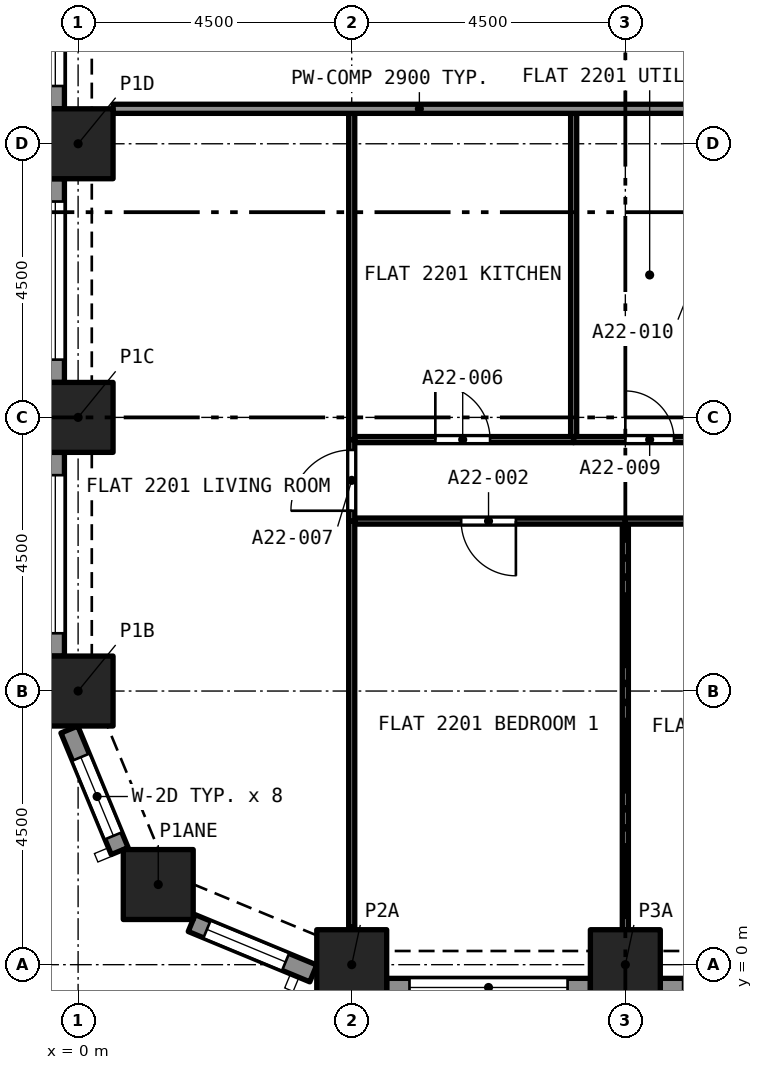
"""IFC4 building model, lengths in metres.
Left out: names, types, materials, properties, quantities, classifications, styles, units other than length and angle.
Written with IfcOpenShell. Run it as: python <this file> out.ifc"""

import sys

from ifc_helpers import new_model, si_unit, direction, frame, frame_2d, origin, origin_2d, place, context, subcontext, project, spatial, rectangle, extrude, element, fill, save


model = new_model("IFC4")
c1 = context("Model", 3, precision=1e-05, world=origin(), true_north=direction((0.0, 1.0)))
c2 = subcontext(c1, "Body", "Model", "MODEL_VIEW")
j1 = project(units=[si_unit("LENGTHUNIT", "METRE"), si_unit("PLANEANGLEUNIT", "RADIAN")], contexts=[c1])
p1 = place(None, origin())
s1 = spatial("IfcSite", under=j1, at=p1, CompositionType="ELEMENT")
p2 = place(p1, origin())
s2 = spatial("IfcBuilding", under=s1, at=p2, CompositionType="ELEMENT")
p3 = place(p2, frame((0.0, 0.0, 83.2)))
s3 = spatial("IfcBuildingStorey", under=s2, at=p3, CompositionType="ELEMENT", Elevation=83.2)
for number, where, z_axis, x_axis in (
    (1, (4.5, 0.0, 0.0), (0.0, 0.0, 1.0), (1.0, 0.0, 0.0)),
    (2, (9.0, 0.0, 0.0), (0.0, 0.0, 1.0), (1.0, 0.0, 0.0)),
    (3, (1.318, 1.318, 0.0), (0.0, 0.0, 1.0), (1.0, 0.0, 0.0)),
    (4, (0.0, 4.5, 0.0), (0.0, 0.0, 1.0), (1.0, 0.0, 0.0)),
    (5, (0.0, 9.0, 0.0), (0.0, 0.0, 1.0), (1.0, 0.0, 0.0)),
    (6, (0.0, 13.5, 0.0), (0.0, 0.0, 1.0), (1.0, 0.0, 0.0)),
):
    element("IfcColumn", number, at=place(p3, frame(where, z_axis=z_axis, x_axis=x_axis)), inside=s3, PredefinedType="COLUMN", context=c2, shape_type="SweptSolid", body=[
        extrude(rectangle(XDim=1.15, YDim=1.15, at=origin_2d()), origin(), (0.0, 0.0, 1.0), 3.2),
    ])
p4 = place(p3, frame((0.684, 1.869, 0.0), z_axis=(0.0, 0.0, 1.0), x_axis=(-0.382723818695, 0.923862802911, 0.0)))
e7 = element("IfcWall", 7, at=p4, inside=s3, PredefinedType="SOLIDWALL", context=c2, shape_type="SweptSolid", body=[
    extrude(rectangle(XDim=2.164, YDim=0.3, at=frame_2d((1.082, 0.0))), origin(), (0.0, 0.0, 1.0), 3.2),
])
p5 = place(p4, frame((0.271, 0.0, 0.45)))
e8 = element("IfcOpeningElement", 8, at=p5, cuts=e7, PredefinedType="OPENING", context=c2, shape_type="SweptSolid", body=[
    extrude(rectangle(XDim=1.4, YDim=1.95, at=frame_2d((0.7, 0.975))), frame((0.0, 0.16, 0.0), z_axis=(0.0, -1.0, 0.0), x_axis=(1.0, 0.0, 0.0)), (0.0, 0.0, 1.0), 0.32),
])
p6 = place(p3, frame((3.868, -0.144, 0.0), z_axis=(0.0, 0.0, 1.0), x_axis=(-0.923862802911, 0.382723818695, 0.0)))
e9 = element("IfcWall", 9, at=p6, inside=s3, PredefinedType="SOLIDWALL", context=c2, shape_type="SweptSolid", body=[
    extrude(rectangle(XDim=2.164, YDim=0.3, at=frame_2d((1.082, 0.0))), origin(), (0.0, 0.0, 1.0), 3.2),
])
p7 = place(p6, frame((0.493, 0.0, 0.45)))
e10 = element("IfcOpeningElement", 10, at=p7, cuts=e9, PredefinedType="OPENING", context=c2, shape_type="SweptSolid", body=[
    extrude(rectangle(XDim=1.4, YDim=1.95, at=frame_2d((0.7, 0.975))), frame((0.0, 0.16, 0.0), z_axis=(0.0, -1.0, 0.0), x_axis=(1.0, 0.0, 0.0)), (0.0, 0.0, 1.0), 0.32),
])
p8 = place(p3, frame((8.425, -0.375, 0.0), z_axis=(0.0, 0.0, 1.0), x_axis=(-1.0, 0.0, 0.0)))
e11 = element("IfcWall", 11, at=p8, inside=s3, PredefinedType="SOLIDWALL", context=c2, shape_type="SweptSolid", body=[
    extrude(rectangle(XDim=3.35, YDim=0.3, at=frame_2d((1.675, 0.0))), origin(), (0.0, 0.0, 1.0), 3.2),
])
p9 = place(p8, frame((0.375, 0.0, 0.45)))
e12 = element("IfcOpeningElement", 12, at=p9, cuts=e11, PredefinedType="OPENING", context=c2, shape_type="SweptSolid", body=[
    extrude(rectangle(XDim=2.6, YDim=1.95, at=frame_2d((1.3, 0.975))), frame((0.0, 0.16, 0.0), z_axis=(0.0, -1.0, 0.0), x_axis=(1.0, 0.0, 0.0)), (0.0, 0.0, 1.0), 0.32),
])
p10 = place(p3, frame((12.925, -0.375, 0.0), z_axis=(0.0, 0.0, 1.0), x_axis=(-1.0, 0.0, 0.0)))
e13 = element("IfcWall", 13, at=p10, inside=s3, PredefinedType="SOLIDWALL", context=c2, shape_type="SweptSolid", body=[
    extrude(rectangle(XDim=3.35, YDim=0.3, at=frame_2d((1.675, 0.0))), origin(), (0.0, 0.0, 1.0), 3.2),
])
p11 = place(p10, frame((0.375, 0.0, 0.45)))
e14 = element("IfcOpeningElement", 14, at=p11, cuts=e13, PredefinedType="OPENING", context=c2, shape_type="SweptSolid", body=[
    extrude(rectangle(XDim=2.6, YDim=1.95, at=frame_2d((1.3, 0.975))), frame((0.0, 0.16, 0.0), z_axis=(0.0, -1.0, 0.0), x_axis=(1.0, 0.0, 0.0)), (0.0, 0.0, 1.0), 0.32),
])
p12 = place(p3, frame((-0.375, 14.075, 0.0), z_axis=(0.0, 0.0, 1.0), x_axis=(0.0, 1.0, 0.0)))
e15 = element("IfcWall", 15, at=p12, inside=s3, PredefinedType="SOLIDWALL", context=c2, shape_type="SweptSolid", body=[
    extrude(rectangle(XDim=3.35, YDim=0.3, at=frame_2d((1.675, 0.0))), origin(), (0.0, 0.0, 1.0), 3.2),
])
p13 = place(p12, frame((0.375, 0.0, 0.45)))
e16 = element("IfcOpeningElement", 16, at=p13, cuts=e15, PredefinedType="OPENING", context=c2, shape_type="SweptSolid", body=[
    extrude(rectangle(XDim=2.6, YDim=1.95, at=frame_2d((1.3, 0.975))), frame((0.0, 0.16, 0.0), z_axis=(0.0, -1.0, 0.0), x_axis=(1.0, 0.0, 0.0)), (0.0, 0.0, 1.0), 0.32),
])
p14 = place(p3, frame((-0.375, 9.575, 0.0), z_axis=(0.0, 0.0, 1.0), x_axis=(0.0, 1.0, 0.0)))
e17 = element("IfcWall", 17, at=p14, inside=s3, PredefinedType="SOLIDWALL", context=c2, shape_type="SweptSolid", body=[
    extrude(rectangle(XDim=3.35, YDim=0.3, at=frame_2d((1.675, 0.0))), origin(), (0.0, 0.0, 1.0), 3.2),
])
p15 = place(p14, frame((0.375, 0.0, 0.45)))
e18 = element("IfcOpeningElement", 18, at=p15, cuts=e17, PredefinedType="OPENING", context=c2, shape_type="SweptSolid", body=[
    extrude(rectangle(XDim=2.6, YDim=1.95, at=frame_2d((1.3, 0.975))), frame((0.0, 0.16, 0.0), z_axis=(0.0, -1.0, 0.0), x_axis=(1.0, 0.0, 0.0)), (0.0, 0.0, 1.0), 0.32),
])
p16 = place(p3, frame((-0.375, 5.075, 0.0), z_axis=(0.0, 0.0, 1.0), x_axis=(0.0, 1.0, 0.0)))
e19 = element("IfcWall", 19, at=p16, inside=s3, PredefinedType="SOLIDWALL", context=c2, shape_type="SweptSolid", body=[
    extrude(rectangle(XDim=3.35, YDim=0.3, at=frame_2d((1.675, 0.0))), origin(), (0.0, 0.0, 1.0), 3.2),
])
p17 = place(p16, frame((0.375, 0.0, 0.45)))
e20 = element("IfcOpeningElement", 20, at=p17, cuts=e19, PredefinedType="OPENING", context=c2, shape_type="SweptSolid", body=[
    extrude(rectangle(XDim=2.6, YDim=1.95, at=frame_2d((1.3, 0.975))), frame((0.0, 0.16, 0.0), z_axis=(0.0, -1.0, 0.0), x_axis=(1.0, 0.0, 0.0)), (0.0, 0.0, 1.0), 0.32),
])
p18 = place(p3, frame((9.0, 0.575, 0.0), z_axis=(0.0, 0.0, 1.0), x_axis=(0.0, 1.0, 0.0)))
e21 = element("IfcWall", 21, at=p18, inside=s3, PredefinedType="PARTITIONING", context=c2, shape_type="SweptSolid", body=[
    extrude(rectangle(XDim=6.67, YDim=0.1, at=frame_2d((3.335, 0.0))), origin(), (0.0, 0.0, 1.0), 2.9),
])
p19 = place(p3, frame((9.0, 7.295, 0.0), z_axis=(0.0, 0.0, 1.0), x_axis=(-1.0, 0.0, 0.0)))
e22 = element("IfcWall", 22, at=p19, inside=s3, PredefinedType="PARTITIONING", context=c2, shape_type="SweptSolid", body=[
    extrude(rectangle(XDim=4.45, YDim=0.1, at=frame_2d((2.225, 0.0))), origin(), (0.0, 0.0, 1.0), 2.9),
])
p20 = place(p19, frame((1.8, 0.0, 0.0)))
e23 = element("IfcOpeningElement", 23, at=p20, cuts=e22, PredefinedType="OPENING", context=c2, shape_type="SweptSolid", body=[
    extrude(rectangle(XDim=0.9, YDim=2.1, at=frame_2d((0.45, 1.05))), frame((0.0, 0.06, 0.0), z_axis=(0.0, -1.0, 0.0), x_axis=(1.0, 0.0, 0.0)), (0.0, 0.0, 1.0), 0.12),
])
p21 = place(p3, frame((4.5, 0.622, 0.0), z_axis=(0.0, 0.0, 1.0), x_axis=(0.0, 1.0, 0.0)))
e24 = element("IfcWall", 24, at=p21, inside=s3, PredefinedType="PARTITIONING", context=c2, shape_type="SweptSolid", body=[
    extrude(rectangle(XDim=6.673, YDim=0.1, at=frame_2d((3.336, 0.0))), origin(), (0.0, 0.0, 1.0), 2.9),
])
p22 = place(p3, frame((13.5, 7.295, 0.0), z_axis=(0.0, 0.0, 1.0), x_axis=(-1.0, 0.0, 0.0)))
e25 = element("IfcWall", 25, at=p22, inside=s3, PredefinedType="PARTITIONING", context=c2, shape_type="SweptSolid", body=[
    extrude(rectangle(XDim=4.5, YDim=0.1, at=frame_2d((2.25, 0.0))), origin(), (0.0, 0.0, 1.0), 2.9),
])
p23 = place(p22, frame((1.8, 0.0, 0.0)))
e26 = element("IfcOpeningElement", 26, at=p23, cuts=e25, PredefinedType="OPENING", context=c2, shape_type="SweptSolid", body=[
    extrude(rectangle(XDim=0.9, YDim=2.1, at=frame_2d((0.45, 1.05))), frame((0.0, 0.06, 0.0), z_axis=(0.0, -1.0, 0.0), x_axis=(1.0, 0.0, 0.0)), (0.0, 0.0, 1.0), 0.12),
])
p24 = place(p3, frame((4.55, 8.635, 0.0), z_axis=(0.0, 0.0, 1.0), x_axis=(1.0, 0.0, 0.0)))
e27 = element("IfcWall", 27, at=p24, inside=s3, PredefinedType="PARTITIONING", context=c2, shape_type="SweptSolid", body=[
    extrude(rectangle(XDim=3.6, YDim=0.1, at=frame_2d((1.8, 0.0))), origin(), (0.0, 0.0, 1.0), 2.9),
])
p25 = place(p24, frame((1.325, 0.0, 0.0)))
e28 = element("IfcOpeningElement", 28, at=p25, cuts=e27, PredefinedType="OPENING", context=c2, shape_type="SweptSolid", body=[
    extrude(rectangle(XDim=0.9, YDim=2.1, at=frame_2d((0.45, 1.05))), frame((0.0, 0.06, 0.0), z_axis=(0.0, -1.0, 0.0), x_axis=(1.0, 0.0, 0.0)), (0.0, 0.0, 1.0), 0.12),
])
p26 = place(p3, frame((4.5, 7.295, 0.0), z_axis=(0.0, 0.0, 1.0), x_axis=(0.0, 1.0, 0.0)))
e29 = element("IfcWall", 29, at=p26, inside=s3, PredefinedType="PARTITIONING", context=c2, shape_type="SweptSolid", body=[
    extrude(rectangle(XDim=1.34, YDim=0.1, at=frame_2d((0.67, 0.0))), origin(), (0.0, 0.0, 1.0), 2.9),
])
p27 = place(p26, frame((0.17, 0.0, 0.0)))
e30 = element("IfcOpeningElement", 30, at=p27, cuts=e29, PredefinedType="OPENING", context=c2, shape_type="SweptSolid", body=[
    extrude(rectangle(XDim=1.0, YDim=2.1, at=frame_2d((0.5, 1.05))), frame((0.0, 0.06, 0.0), z_axis=(0.0, -1.0, 0.0), x_axis=(1.0, 0.0, 0.0)), (0.0, 0.0, 1.0), 0.12),
])
p28 = place(p3, frame((8.15, 8.635, 0.0), z_axis=(0.0, 0.0, 1.0), x_axis=(1.0, 0.0, 0.0)))
e31 = element("IfcWall", 31, at=p28, inside=s3, PredefinedType="PARTITIONING", context=c2, shape_type="SweptSolid", body=[
    extrude(rectangle(XDim=2.55, YDim=0.1, at=frame_2d((1.275, 0.0))), origin(), (0.0, 0.0, 1.0), 2.9),
])
p29 = place(p28, frame((0.85, 0.0, 0.0)))
e32 = element("IfcOpeningElement", 32, at=p29, cuts=e31, PredefinedType="OPENING", context=c2, shape_type="SweptSolid", body=[
    extrude(rectangle(XDim=0.8, YDim=2.1, at=frame_2d((0.4, 1.05))), frame((0.0, 0.06, 0.0), z_axis=(0.0, -1.0, 0.0), x_axis=(1.0, 0.0, 0.0)), (0.0, 0.0, 1.0), 0.12),
])
p30 = place(p3, frame((4.5, 8.635, 0.0), z_axis=(0.0, 0.0, 1.0), x_axis=(0.0, 1.0, 0.0)))
e33 = element("IfcWall", 33, at=p30, inside=s3, PredefinedType="PARTITIONING", context=c2, shape_type="SweptSolid", body=[
    extrude(rectangle(XDim=5.365, YDim=0.1, at=frame_2d((2.683, 0.0))), origin(), (0.0, 0.0, 1.0), 2.9),
])
p31 = place(p3, frame((8.15, 8.685, 0.0), z_axis=(0.0, 0.0, 1.0), x_axis=(0.0, 1.0, 0.0)))
e34 = element("IfcWall", 34, at=p31, inside=s3, PredefinedType="PARTITIONING", context=c2, shape_type="SweptSolid", body=[
    extrude(rectangle(XDim=5.315, YDim=0.1, at=frame_2d((2.657, 0.0))), origin(), (0.0, 0.0, 1.0), 2.9),
])
p32 = place(p3, frame((0.575, 14.075, 0.0), z_axis=(0.0, 0.0, 1.0), x_axis=(1.0, 0.0, 0.0)))
e35 = element("IfcWall", 35, at=p32, inside=s3, PredefinedType="PARTITIONING", context=c2, shape_type="SweptSolid", body=[
    extrude(rectangle(XDim=10.075, YDim=0.15, at=frame_2d((5.038, 0.0))), origin(), (0.0, 0.0, 1.0), 2.9),
])
p33 = place(p5, origin())
e36 = element("IfcWindow", 36, at=p33, inside=s3, PartitioningType="SINGLE_PANEL", PredefinedType="WINDOW", context=c2, shape_type="SweptSolid", body=[
    extrude(rectangle(XDim=1.4, YDim=1.95, at=frame_2d((0.7, 0.975))), frame((0.0, 0.03, 0.0), z_axis=(0.0, -1.0, 0.0), x_axis=(1.0, 0.0, 0.0)), (0.0, 0.0, 1.0), 0.06),
])
fill(e8, e36)
p34 = place(p7, origin())
e37 = element("IfcWindow", 37, at=p34, inside=s3, PartitioningType="SINGLE_PANEL", PredefinedType="WINDOW", context=c2, shape_type="SweptSolid", body=[
    extrude(rectangle(XDim=1.4, YDim=1.95, at=frame_2d((0.7, 0.975))), frame((0.0, 0.03, 0.0), z_axis=(0.0, -1.0, 0.0), x_axis=(1.0, 0.0, 0.0)), (0.0, 0.0, 1.0), 0.06),
])
fill(e10, e37)
p35 = place(p9, origin())
e38 = element("IfcWindow", 38, at=p35, inside=s3, PartitioningType="SINGLE_PANEL", PredefinedType="WINDOW", context=c2, shape_type="SweptSolid", body=[
    extrude(rectangle(XDim=2.6, YDim=1.95, at=frame_2d((1.3, 0.975))), frame((0.0, 0.03, 0.0), z_axis=(0.0, -1.0, 0.0), x_axis=(1.0, 0.0, 0.0)), (0.0, 0.0, 1.0), 0.06),
])
fill(e12, e38)
p36 = place(p13, origin())
e39 = element("IfcWindow", 39, at=p36, inside=s3, PartitioningType="SINGLE_PANEL", PredefinedType="WINDOW", context=c2, shape_type="SweptSolid", body=[
    extrude(rectangle(XDim=2.6, YDim=1.95, at=frame_2d((1.3, 0.975))), frame((0.0, 0.03, 0.0), z_axis=(0.0, -1.0, 0.0), x_axis=(1.0, 0.0, 0.0)), (0.0, 0.0, 1.0), 0.06),
])
fill(e16, e39)
p37 = place(p15, origin())
e40 = element("IfcWindow", 40, at=p37, inside=s3, PartitioningType="SINGLE_PANEL", PredefinedType="WINDOW", context=c2, shape_type="SweptSolid", body=[
    extrude(rectangle(XDim=2.6, YDim=1.95, at=frame_2d((1.3, 0.975))), frame((0.0, 0.03, 0.0), z_axis=(0.0, -1.0, 0.0), x_axis=(1.0, 0.0, 0.0)), (0.0, 0.0, 1.0), 0.06),
])
fill(e18, e40)
p38 = place(p17, origin())
e41 = element("IfcWindow", 41, at=p38, inside=s3, PartitioningType="SINGLE_PANEL", PredefinedType="WINDOW", context=c2, shape_type="SweptSolid", body=[
    extrude(rectangle(XDim=2.6, YDim=1.95, at=frame_2d((1.3, 0.975))), frame((0.0, 0.03, 0.0), z_axis=(0.0, -1.0, 0.0), x_axis=(1.0, 0.0, 0.0)), (0.0, 0.0, 1.0), 0.06),
])
fill(e20, e41)
p39 = place(p20, origin())
e42 = element("IfcDoor", 42, at=p39, inside=s3, OperationType="SINGLE_SWING_RIGHT", PredefinedType="DOOR", context=c2, shape_type="SweptSolid", body=[
    extrude(rectangle(XDim=0.9, YDim=2.1, at=frame_2d((0.45, 1.05))), frame((0.0, 0.025, 0.0), z_axis=(0.0, -1.0, 0.0), x_axis=(1.0, 0.0, 0.0)), (0.0, 0.0, 1.0), 0.05),
])
fill(e23, e42)
p40 = place(p25, origin())
e43 = element("IfcDoor", 43, at=p40, inside=s3, OperationType="SINGLE_SWING_LEFT", PredefinedType="DOOR", context=c2, shape_type="SweptSolid", body=[
    extrude(rectangle(XDim=0.9, YDim=2.1, at=frame_2d((0.45, 1.05))), frame((0.0, 0.025, 0.0), z_axis=(0.0, -1.0, 0.0), x_axis=(1.0, 0.0, 0.0)), (0.0, 0.0, 1.0), 0.05),
])
fill(e28, e43)
p41 = place(p27, origin())
e44 = element("IfcDoor", 44, at=p41, inside=s3, OperationType="SINGLE_SWING_RIGHT", PredefinedType="DOOR", context=c2, shape_type="SweptSolid", body=[
    extrude(rectangle(XDim=1.0, YDim=2.1, at=frame_2d((0.5, 1.05))), frame((0.0, 0.025, 0.0), z_axis=(0.0, -1.0, 0.0), x_axis=(1.0, 0.0, 0.0)), (0.0, 0.0, 1.0), 0.05),
])
fill(e30, e44)
p42 = place(p29, origin())
e45 = element("IfcDoor", 45, at=p42, inside=s3, OperationType="SINGLE_SWING_LEFT", PredefinedType="DOOR", context=c2, shape_type="SweptSolid", body=[
    extrude(rectangle(XDim=0.8, YDim=2.1, at=frame_2d((0.4, 1.05))), frame((0.0, 0.025, 0.0), z_axis=(0.0, -1.0, 0.0), x_axis=(1.0, 0.0, 0.0)), (0.0, 0.0, 1.0), 0.05),
])
fill(e32, e45)
save(model, sys.argv[1])
